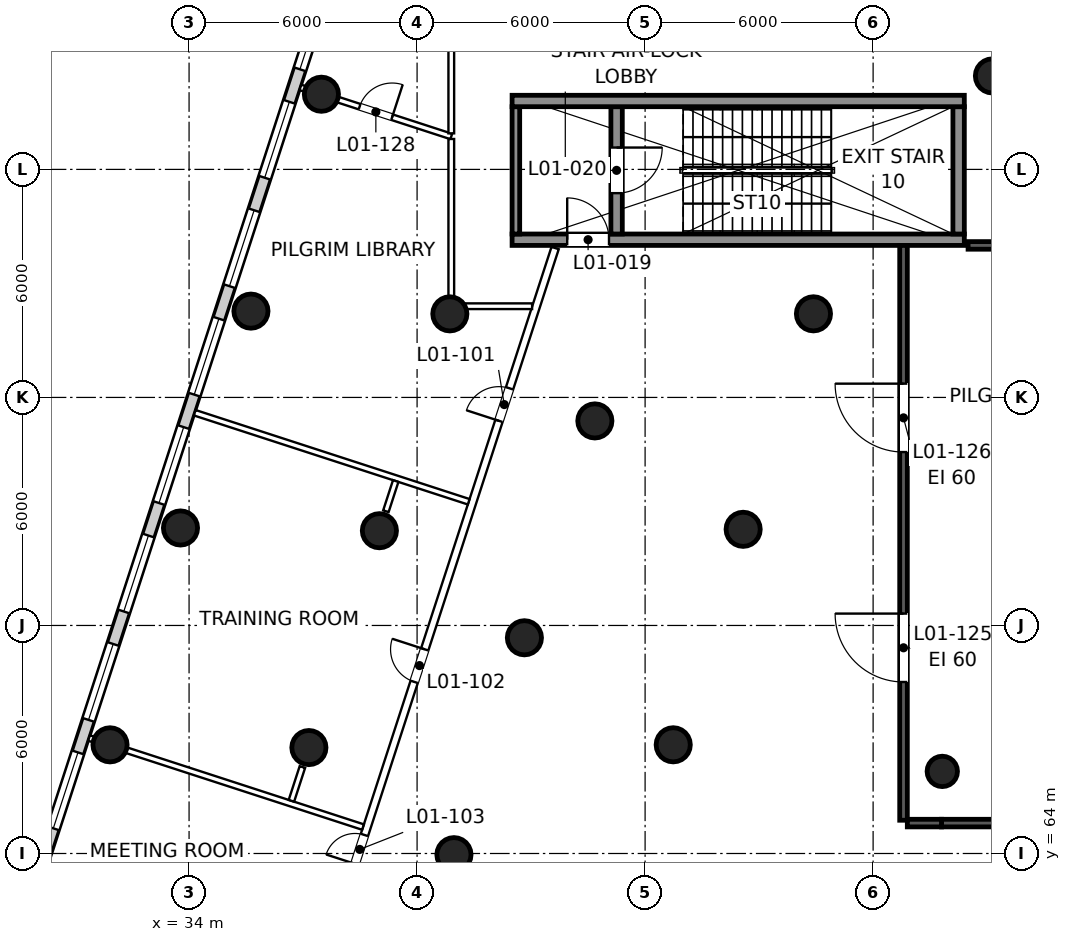
"""IFC4 building model, lengths in metres.
Left out: names, types, materials, properties, quantities, classifications, styles, units other than length and angle.
Written with IfcOpenShell. Run it as: python <this file> out.ifc"""

import sys

from ifc_helpers import new_model, si_unit, direction, frame, frame_2d, origin, origin_2d, place, context, subcontext, project, spatial, rectangle, circle, extrude, element, fill, save


model = new_model("IFC4")
c1 = context("Model", 3, precision=1e-05, world=origin(), true_north=direction((0.0, 1.0)))
c2 = subcontext(c1, "Body", "Model", "MODEL_VIEW")
j1 = project(units=[si_unit("LENGTHUNIT", "METRE"), si_unit("PLANEANGLEUNIT", "RADIAN")], contexts=[c1])
p1 = place(None, origin())
s1 = spatial("IfcSite", under=j1, at=p1, CompositionType="ELEMENT")
p2 = place(p1, origin())
s2 = spatial("IfcBuilding", under=s1, at=p2, CompositionType="ELEMENT")
p3 = place(p2, frame((0.0, 0.0, 9.0)))
s3 = spatial("IfcBuildingStorey", under=s2, at=p3, CompositionType="ELEMENT", Elevation=9.0)
for number, where, z_axis, x_axis in (
    (1, (55.14, 84.46, 0.0), (0.0, 0.0, 1.0), (1.0, 0.0, 0.0)),
    (2, (50.43, 78.2, 0.0), (0.0, 0.0, 1.0), (1.0, 0.0, 0.0)),
    (3, (48.58, 72.53, 0.0), (0.0, 0.0, 1.0), (1.0, 0.0, 0.0)),
    (4, (46.74, 66.86, 0.0), (0.0, 0.0, 1.0), (1.0, 0.0, 0.0)),
):
    element("IfcColumn", number, at=place(p3, frame(where, z_axis=z_axis, x_axis=x_axis)), inside=s3, PredefinedType="COLUMN", context=c2, shape_type="SweptSolid", body=[
        extrude(circle(Radius=0.45, at=origin_2d()), origin(), (0.0, 0.0, 1.0), 6.0),
    ])
p4 = place(p3, frame((53.82, 66.16, 0.0), z_axis=(0.0, 0.0, 1.0), x_axis=(1.0, 0.0, 0.0)))
e5 = element("IfcColumn", 5, at=p4, inside=s3, PredefinedType="COLUMN", context=c2, shape_type="SweptSolid", body=[
    extrude(circle(Radius=0.4, at=origin_2d()), origin(), (0.0, 0.0, 1.0), 6.0),
])
for number, where, z_axis, x_axis in (
    (6, (37.482, 83.978, 0.0), (0.0, 0.0, 1.0), (1.0, 0.0, 0.0)),
    (7, (35.628, 78.271, 0.0), (0.0, 0.0, 1.0), (1.0, 0.0, 0.0)),
    (8, (33.774, 72.565, 0.0), (0.0, 0.0, 1.0), (1.0, 0.0, 0.0)),
    (9, (31.92, 66.859, 0.0), (0.0, 0.0, 1.0), (1.0, 0.0, 0.0)),
    (10, (40.862, 78.199, 0.0), (0.0, 0.0, 1.0), (1.0, 0.0, 0.0)),
    (11, (39.008, 72.493, 0.0), (0.0, 0.0, 1.0), (1.0, 0.0, 0.0)),
    (12, (37.153, 66.787, 0.0), (0.0, 0.0, 1.0), (1.0, 0.0, 0.0)),
    (13, (44.678, 75.382, 0.0), (0.0, 0.0, 1.0), (1.0, 0.0, 0.0)),
    (14, (42.824, 69.676, 0.0), (0.0, 0.0, 1.0), (1.0, 0.0, 0.0)),
    (15, (40.97, 63.969, 0.0), (0.0, 0.0, 1.0), (1.0, 0.0, 0.0)),
):
    element("IfcColumn", number, at=place(p3, frame(where, z_axis=z_axis, x_axis=x_axis)), inside=s3, PredefinedType="COLUMN", context=c2, shape_type="SweptSolid", body=[
        extrude(circle(Radius=0.45, at=origin_2d()), origin(), (0.0, 0.0, 1.0), 6.0),
    ])
p5 = place(p3, frame((37.912, 87.697, 0.0), z_axis=(0.0, 0.0, 1.0), x_axis=(-0.309016476183, -0.951056684666, 0.0)))
e16 = element("IfcWall", 16, at=p5, inside=s3, PredefinedType="SOLIDWALL", context=c2, shape_type="SweptSolid", body=[
    extrude(rectangle(XDim=28.556, YDim=0.32, at=frame_2d((14.278, 0.0))), origin(), (0.0, 0.0, 1.0), 5.65),
])
p6 = place(p5, frame((1.121, 0.0, 0.9)))
e17 = element("IfcOpeningElement", 17, at=p6, cuts=e16, PredefinedType="OPENING", context=c2, shape_type="SweptSolid", body=[
    extrude(rectangle(XDim=2.1, YDim=3.0, at=frame_2d((1.05, 1.5))), frame((0.0, 0.17, 0.0), z_axis=(0.0, -1.0, 0.0), x_axis=(1.0, 0.0, 0.0)), (0.0, 0.0, 1.0), 0.34),
])
p7 = place(p5, frame((4.121, 0.0, 0.9)))
e18 = element("IfcOpeningElement", 18, at=p7, cuts=e16, PredefinedType="OPENING", context=c2, shape_type="SweptSolid", body=[
    extrude(rectangle(XDim=2.1, YDim=3.0, at=frame_2d((1.05, 1.5))), frame((0.0, 0.17, 0.0), z_axis=(0.0, -1.0, 0.0), x_axis=(1.0, 0.0, 0.0)), (0.0, 0.0, 1.0), 0.34),
])
p8 = place(p5, frame((7.121, 0.0, 0.9)))
e19 = element("IfcOpeningElement", 19, at=p8, cuts=e16, PredefinedType="OPENING", context=c2, shape_type="SweptSolid", body=[
    extrude(rectangle(XDim=2.1, YDim=3.0, at=frame_2d((1.05, 1.5))), frame((0.0, 0.17, 0.0), z_axis=(0.0, -1.0, 0.0), x_axis=(1.0, 0.0, 0.0)), (0.0, 0.0, 1.0), 0.34),
])
p9 = place(p5, frame((10.121, 0.0, 0.9)))
e20 = element("IfcOpeningElement", 20, at=p9, cuts=e16, PredefinedType="OPENING", context=c2, shape_type="SweptSolid", body=[
    extrude(rectangle(XDim=2.1, YDim=3.0, at=frame_2d((1.05, 1.5))), frame((0.0, 0.17, 0.0), z_axis=(0.0, -1.0, 0.0), x_axis=(1.0, 0.0, 0.0)), (0.0, 0.0, 1.0), 0.34),
])
p10 = place(p5, frame((13.121, 0.0, 0.9)))
e21 = element("IfcOpeningElement", 21, at=p10, cuts=e16, PredefinedType="OPENING", context=c2, shape_type="SweptSolid", body=[
    extrude(rectangle(XDim=2.1, YDim=3.0, at=frame_2d((1.05, 1.5))), frame((0.0, 0.17, 0.0), z_axis=(0.0, -1.0, 0.0), x_axis=(1.0, 0.0, 0.0)), (0.0, 0.0, 1.0), 0.34),
])
p11 = place(p5, frame((16.121, 0.0, 0.9)))
e22 = element("IfcOpeningElement", 22, at=p11, cuts=e16, PredefinedType="OPENING", context=c2, shape_type="SweptSolid", body=[
    extrude(rectangle(XDim=2.1, YDim=3.0, at=frame_2d((1.05, 1.5))), frame((0.0, 0.17, 0.0), z_axis=(0.0, -1.0, 0.0), x_axis=(1.0, 0.0, 0.0)), (0.0, 0.0, 1.0), 0.34),
])
p12 = place(p5, frame((19.121, 0.0, 0.9)))
e23 = element("IfcOpeningElement", 23, at=p12, cuts=e16, PredefinedType="OPENING", context=c2, shape_type="SweptSolid", body=[
    extrude(rectangle(XDim=2.1, YDim=3.0, at=frame_2d((1.05, 1.5))), frame((0.0, 0.17, 0.0), z_axis=(0.0, -1.0, 0.0), x_axis=(1.0, 0.0, 0.0)), (0.0, 0.0, 1.0), 0.34),
])
p13 = place(p5, frame((22.121, 0.0, 0.9)))
e24 = element("IfcOpeningElement", 24, at=p13, cuts=e16, PredefinedType="OPENING", context=c2, shape_type="SweptSolid", body=[
    extrude(rectangle(XDim=2.1, YDim=3.0, at=frame_2d((1.05, 1.5))), frame((0.0, 0.17, 0.0), z_axis=(0.0, -1.0, 0.0), x_axis=(1.0, 0.0, 0.0)), (0.0, 0.0, 1.0), 0.34),
])
p14 = place(p5, frame((25.121, 0.0, 0.9)))
e25 = element("IfcOpeningElement", 25, at=p14, cuts=e16, PredefinedType="OPENING", context=c2, shape_type="SweptSolid", body=[
    extrude(rectangle(XDim=2.1, YDim=3.0, at=frame_2d((1.05, 1.5))), frame((0.0, 0.17, 0.0), z_axis=(0.0, -1.0, 0.0), x_axis=(1.0, 0.0, 0.0)), (0.0, 0.0, 1.0), 0.34),
])
p15 = place(p3, frame((42.5, 80.15, 0.0), z_axis=(0.0, 0.0, 1.0), x_axis=(1.0, 0.0, 0.0)))
e26 = element("IfcWall", 26, at=p15, inside=s3, PredefinedType="SHEAR", context=c2, shape_type="SweptSolid", body=[
    extrude(rectangle(XDim=11.9, YDim=0.3, at=frame_2d((5.95, 0.0))), origin(), (0.0, 0.0, 1.0), 6.0),
])
p16 = place(p15, frame((1.45, 0.0, 0.0)))
e27 = element("IfcOpeningElement", 27, at=p16, cuts=e26, PredefinedType="OPENING", context=c2, shape_type="SweptSolid", body=[
    extrude(rectangle(XDim=1.1, YDim=2.1, at=frame_2d((0.55, 1.05))), frame((0.0, 0.16, 0.0), z_axis=(0.0, -1.0, 0.0), x_axis=(1.0, 0.0, 0.0)), (0.0, 0.0, 1.0), 0.32),
])
p17 = place(p3, frame((42.6, 80.3, 0.0), z_axis=(0.0, 0.0, 1.0), x_axis=(0.0, 1.0, 0.0)))
e28 = element("IfcWall", 28, at=p17, inside=s3, PredefinedType="SHEAR", context=c2, shape_type="SweptSolid", body=[
    extrude(rectangle(XDim=3.35, YDim=0.2, at=frame_2d((1.675, 0.0))), origin(), (0.0, 0.0, 1.0), 6.0),
])
p18 = place(p3, frame((45.25, 80.3, 0.0), z_axis=(0.0, 0.0, 1.0), x_axis=(0.0, 1.0, 0.0)))
e29 = element("IfcWall", 29, at=p18, inside=s3, PredefinedType="SHEAR", context=c2, shape_type="SweptSolid", body=[
    extrude(rectangle(XDim=3.35, YDim=0.3, at=frame_2d((1.675, 0.0))), origin(), (0.0, 0.0, 1.0), 6.0),
])
p19 = place(p18, frame((1.075, 0.0, 0.0)))
e30 = element("IfcOpeningElement", 30, at=p19, cuts=e29, PredefinedType="OPENING", context=c2, shape_type="SweptSolid", body=[
    extrude(rectangle(XDim=1.2, YDim=2.1, at=frame_2d((0.6, 1.05))), frame((0.0, 0.16, 0.0), z_axis=(0.0, -1.0, 0.0), x_axis=(1.0, 0.0, 0.0)), (0.0, 0.0, 1.0), 0.32),
])
p20 = place(p3, frame((54.25, 80.3, 0.0), z_axis=(0.0, 0.0, 1.0), x_axis=(0.0, 1.0, 0.0)))
e31 = element("IfcWall", 31, at=p20, inside=s3, PredefinedType="SHEAR", context=c2, shape_type="SweptSolid", body=[
    extrude(rectangle(XDim=3.35, YDim=0.3, at=frame_2d((1.675, 0.0))), origin(), (0.0, 0.0, 1.0), 6.0),
])
p21 = place(p3, frame((42.5, 83.8, 0.0), z_axis=(0.0, 0.0, 1.0), x_axis=(1.0, 0.0, 0.0)))
e32 = element("IfcWall", 32, at=p21, inside=s3, PredefinedType="SHEAR", context=c2, shape_type="SweptSolid", body=[
    extrude(rectangle(XDim=11.9, YDim=0.3, at=frame_2d((5.95, 0.0))), origin(), (0.0, 0.0, 1.0), 6.0),
])
p22 = place(p3, frame((37.833, 62.081, 0.0), z_axis=(0.0, 0.0, 1.0), x_axis=(0.309014892187, 0.951057199335, 0.0)))
e33 = element("IfcWall", 33, at=p22, inside=s3, PredefinedType="PARTITIONING", context=c2, shape_type="SweptSolid", body=[
    extrude(rectangle(XDim=18.769, YDim=0.2, at=frame_2d((9.384, 0.0))), origin(), (0.0, 0.0, 1.0), 5.65),
])
p23 = place(p22, frame((13.988, 0.0, 0.0)))
e34 = element("IfcOpeningElement", 34, at=p23, cuts=e33, PredefinedType="OPENING", context=c2, shape_type="SweptSolid", body=[
    extrude(rectangle(XDim=0.9, YDim=2.1, at=frame_2d((0.45, 1.05))), frame((0.0, 0.11, 0.0), z_axis=(0.0, -1.0, 0.0), x_axis=(1.0, 0.0, 0.0)), (0.0, 0.0, 1.0), 0.22),
])
p24 = place(p22, frame((6.767, 0.0, 0.0)))
e35 = element("IfcOpeningElement", 35, at=p24, cuts=e33, PredefinedType="OPENING", context=c2, shape_type="SweptSolid", body=[
    extrude(rectangle(XDim=0.9, YDim=2.1, at=frame_2d((0.45, 1.05))), frame((0.0, 0.11, 0.0), z_axis=(0.0, -1.0, 0.0), x_axis=(1.0, 0.0, 0.0)), (0.0, 0.0, 1.0), 0.22),
])
p25 = place(p22, frame((1.731, 0.0, 0.0)))
e36 = element("IfcOpeningElement", 36, at=p25, cuts=e33, PredefinedType="OPENING", context=c2, shape_type="SweptSolid", body=[
    extrude(rectangle(XDim=0.8, YDim=2.1, at=frame_2d((0.4, 1.05))), frame((0.0, 0.11, 0.0), z_axis=(0.0, -1.0, 0.0), x_axis=(1.0, 0.0, 0.0)), (0.0, 0.0, 1.0), 0.22),
])
p26 = place(p3, frame((54.499, 80.0, 0.0), z_axis=(0.0, 0.0, 1.0), x_axis=(1.0, 0.0, 0.0)))
e37 = element("IfcWall", 37, at=p26, inside=s3, PredefinedType="PARTITIONING", context=c2, shape_type="SweptSolid", body=[
    extrude(rectangle(XDim=2.301, YDim=0.2, at=frame_2d((1.15, 0.0))), origin(), (0.0, 0.0, 1.0), 5.65),
])
p27 = place(p3, frame((36.93, 84.157, 0.0), z_axis=(0.0, 0.0, 1.0), x_axis=(0.951059855583, -0.309006716915, 0.0)))
e38 = element("IfcWall", 38, at=p27, inside=s3, PredefinedType="PARTITIONING", context=c2, shape_type="SweptSolid", body=[
    extrude(rectangle(XDim=4.174, YDim=0.15, at=frame_2d((2.087, 0.0))), origin(), (0.0, 0.0, 1.0), 5.65),
])
p28 = place(p27, frame((1.637, 0.0, 0.0)))
e39 = element("IfcOpeningElement", 39, at=p28, cuts=e38, PredefinedType="OPENING", context=c2, shape_type="SweptSolid", body=[
    extrude(rectangle(XDim=0.9, YDim=2.1, at=frame_2d((0.45, 1.05))), frame((0.0, 0.085, 0.0), z_axis=(0.0, -1.0, 0.0), x_axis=(1.0, 0.0, 0.0)), (0.0, 0.0, 1.0), 0.17),
])
for number, where, z_axis, x_axis in (
    (40, (34.149, 75.597, 0.0), (0.0, 0.0, 1.0), (0.951, -0.309, 0.0)),
    (41, (31.368, 67.038, 0.0), (0.0, 0.0, 1.0), (0.951, -0.309, 0.0)),
):
    element("IfcWall", number, at=place(p3, frame(where, z_axis=z_axis, x_axis=x_axis)), inside=s3, PredefinedType="PARTITIONING", context=c2, shape_type="SweptSolid", body=[
        extrude(rectangle(XDim=7.58, YDim=0.15, at=frame_2d((3.79, 0.0))), origin(), (0.0, 0.0, 1.0), 4.95),
    ])
p29 = place(p3, frame((86.2, 64.8, 0.0), z_axis=(0.0, 0.0, 1.0), x_axis=(-1.0, 0.0, 0.0)))
e42 = element("IfcWall", 42, at=p29, inside=s3, PredefinedType="PARTITIONING", context=c2, shape_type="SweptSolid", body=[
    extrude(rectangle(XDim=32.4, YDim=0.2, at=frame_2d((16.2, 0.0))), origin(), (0.0, 0.0, 1.0), 5.65),
])
p30 = place(p29, frame((8.45, 0.0, 0.0)))
e43 = element("IfcOpeningElement", 43, at=p30, cuts=e42, PredefinedType="OPENING", context=c2, shape_type="SweptSolid", body=[
    extrude(rectangle(XDim=1.8, YDim=2.1, at=frame_2d((0.9, 1.05))), frame((0.0, 0.11, 0.0), z_axis=(0.0, -1.0, 0.0), x_axis=(1.0, 0.0, 0.0)), (0.0, 0.0, 1.0), 0.22),
])
p31 = place(p29, frame((22.15, 0.0, 0.0)))
e44 = element("IfcOpeningElement", 44, at=p31, cuts=e42, PredefinedType="OPENING", context=c2, shape_type="SweptSolid", body=[
    extrude(rectangle(XDim=1.8, YDim=2.1, at=frame_2d((0.9, 1.05))), frame((0.0, 0.11, 0.0), z_axis=(0.0, -1.0, 0.0), x_axis=(1.0, 0.0, 0.0)), (0.0, 0.0, 1.0), 0.22),
])
p32 = place(p3, frame((53.8, 64.8, 0.0), z_axis=(0.0, 0.0, 1.0), x_axis=(-1.0, 0.0, 0.0)))
e45 = element("IfcWall", 45, at=p32, inside=s3, PredefinedType="PARTITIONING", context=c2, shape_type="SweptSolid", body=[
    extrude(rectangle(XDim=0.9, YDim=0.2, at=frame_2d((0.45, 0.0))), origin(), (0.0, 0.0, 1.0), 4.85),
])
p33 = place(p3, frame((52.8, 64.875, 0.0), z_axis=(0.0, 0.0, 1.0), x_axis=(0.0, 1.0, 0.0)))
e46 = element("IfcWall", 46, at=p33, inside=s3, PredefinedType="PARTITIONING", context=c2, shape_type="SweptSolid", body=[
    extrude(rectangle(XDim=15.125, YDim=0.2, at=frame_2d((7.562, 0.0))), origin(), (0.0, 0.0, 1.0), 5.65),
])
p34 = place(p33, frame((3.637, 0.0, 0.0)))
e47 = element("IfcOpeningElement", 47, at=p34, cuts=e46, PredefinedType="OPENING", context=c2, shape_type="SweptSolid", body=[
    extrude(rectangle(XDim=1.8, YDim=2.1, at=frame_2d((0.9, 1.05))), frame((0.0, 0.11, 0.0), z_axis=(0.0, -1.0, 0.0), x_axis=(1.0, 0.0, 0.0)), (0.0, 0.0, 1.0), 0.22),
])
p35 = place(p33, frame((9.688, 0.0, 0.0)))
e48 = element("IfcOpeningElement", 48, at=p35, cuts=e46, PredefinedType="OPENING", context=c2, shape_type="SweptSolid", body=[
    extrude(rectangle(XDim=1.8, YDim=2.1, at=frame_2d((0.9, 1.05))), frame((0.0, 0.11, 0.0), z_axis=(0.0, -1.0, 0.0), x_axis=(1.0, 0.0, 0.0)), (0.0, 0.0, 1.0), 0.22),
])
p36 = place(p3, frame((39.179, 73.005, 0.0), z_axis=(0.0, 0.0, 1.0), x_axis=(0.309033234433, 0.951051239427, 0.0)))
e49 = element("IfcWall", 49, at=p36, inside=s3, PredefinedType="PARTITIONING", context=c2, shape_type="SweptSolid", body=[
    extrude(rectangle(XDim=0.836, YDim=0.15, at=frame_2d((0.418, 0.0))), origin(), (0.0, 0.0, 1.0), 4.95),
])
p37 = place(p3, frame((36.982, 66.275, 0.0), z_axis=(0.0, 0.0, 1.0), x_axis=(-0.309162892006, -0.951009098908, 0.0)))
e50 = element("IfcWall", 50, at=p37, inside=s3, PredefinedType="PARTITIONING", context=c2, shape_type="SweptSolid", body=[
    extrude(rectangle(XDim=0.934, YDim=0.15, at=frame_2d((0.467, 0.0))), origin(), (0.0, 0.0, 1.0), 4.95),
])
p38 = place(p3, frame((40.9, 82.8, 0.0), z_axis=(0.0, 0.0, 1.0), x_axis=(0.0, -1.0, 0.0)))
e51 = element("IfcWall", 51, at=p38, inside=s3, PredefinedType="PARTITIONING", context=c2, shape_type="SweptSolid", body=[
    extrude(rectangle(XDim=4.46, YDim=0.15, at=frame_2d((2.23, 0.0))), origin(), (0.0, 0.0, 1.0), 5.65),
])
p39 = place(p3, frame((40.84, 78.4, 0.0), z_axis=(0.0, 0.0, 1.0), x_axis=(1.0, 0.0, 0.0)))
e52 = element("IfcWall", 52, at=p39, inside=s3, PredefinedType="PARTITIONING", context=c2, shape_type="SweptSolid", body=[
    extrude(rectangle(XDim=2.187, YDim=0.15, at=frame_2d((1.093, 0.0))), origin(), (0.0, 0.0, 1.0), 4.95),
])
p40 = place(p3, frame((40.9, 85.61, 0.0), z_axis=(0.0, 0.0, 1.0), x_axis=(0.0, -1.0, 0.0)))
e53 = element("IfcWall", 53, at=p40, inside=s3, PredefinedType="PARTITIONING", context=c2, shape_type="SweptSolid", body=[
    extrude(rectangle(XDim=2.661, YDim=0.15, at=frame_2d((1.331, 0.0))), origin(), (0.0, 0.0, 1.0), 5.65),
])
p41 = place(p6, origin())
e54 = element("IfcWindow", 54, at=p41, inside=s3, PartitioningType="SINGLE_PANEL", PredefinedType="WINDOW", context=c2, shape_type="SweptSolid", body=[
    extrude(rectangle(XDim=2.1, YDim=3.0, at=frame_2d((1.05, 1.5))), frame((0.0, 0.07, 0.0), z_axis=(0.0, -1.0, 0.0), x_axis=(1.0, 0.0, 0.0)), (0.0, 0.0, 1.0), 0.06),
])
fill(e17, e54)
p42 = place(p7, origin())
e55 = element("IfcWindow", 55, at=p42, inside=s3, PartitioningType="SINGLE_PANEL", PredefinedType="WINDOW", context=c2, shape_type="SweptSolid", body=[
    extrude(rectangle(XDim=2.1, YDim=3.0, at=frame_2d((1.05, 1.5))), frame((0.0, 0.07, 0.0), z_axis=(0.0, -1.0, 0.0), x_axis=(1.0, 0.0, 0.0)), (0.0, 0.0, 1.0), 0.06),
])
fill(e18, e55)
p43 = place(p8, origin())
e56 = element("IfcWindow", 56, at=p43, inside=s3, PartitioningType="SINGLE_PANEL", PredefinedType="WINDOW", context=c2, shape_type="SweptSolid", body=[
    extrude(rectangle(XDim=2.1, YDim=3.0, at=frame_2d((1.05, 1.5))), frame((0.0, 0.07, 0.0), z_axis=(0.0, -1.0, 0.0), x_axis=(1.0, 0.0, 0.0)), (0.0, 0.0, 1.0), 0.06),
])
fill(e19, e56)
p44 = place(p9, origin())
e57 = element("IfcWindow", 57, at=p44, inside=s3, PartitioningType="SINGLE_PANEL", PredefinedType="WINDOW", context=c2, shape_type="SweptSolid", body=[
    extrude(rectangle(XDim=2.1, YDim=3.0, at=frame_2d((1.05, 1.5))), frame((0.0, 0.07, 0.0), z_axis=(0.0, -1.0, 0.0), x_axis=(1.0, 0.0, 0.0)), (0.0, 0.0, 1.0), 0.06),
])
fill(e20, e57)
p45 = place(p10, origin())
e58 = element("IfcWindow", 58, at=p45, inside=s3, PartitioningType="SINGLE_PANEL", PredefinedType="WINDOW", context=c2, shape_type="SweptSolid", body=[
    extrude(rectangle(XDim=2.1, YDim=3.0, at=frame_2d((1.05, 1.5))), frame((0.0, 0.07, 0.0), z_axis=(0.0, -1.0, 0.0), x_axis=(1.0, 0.0, 0.0)), (0.0, 0.0, 1.0), 0.06),
])
fill(e21, e58)
p46 = place(p11, origin())
e59 = element("IfcWindow", 59, at=p46, inside=s3, PartitioningType="SINGLE_PANEL", PredefinedType="WINDOW", context=c2, shape_type="SweptSolid", body=[
    extrude(rectangle(XDim=2.1, YDim=3.0, at=frame_2d((1.05, 1.5))), frame((0.0, 0.07, 0.0), z_axis=(0.0, -1.0, 0.0), x_axis=(1.0, 0.0, 0.0)), (0.0, 0.0, 1.0), 0.06),
])
fill(e22, e59)
p47 = place(p12, origin())
e60 = element("IfcWindow", 60, at=p47, inside=s3, PartitioningType="SINGLE_PANEL", PredefinedType="WINDOW", context=c2, shape_type="SweptSolid", body=[
    extrude(rectangle(XDim=2.1, YDim=3.0, at=frame_2d((1.05, 1.5))), frame((0.0, 0.07, 0.0), z_axis=(0.0, -1.0, 0.0), x_axis=(1.0, 0.0, 0.0)), (0.0, 0.0, 1.0), 0.06),
])
fill(e23, e60)
p48 = place(p13, origin())
e61 = element("IfcWindow", 61, at=p48, inside=s3, PartitioningType="SINGLE_PANEL", PredefinedType="WINDOW", context=c2, shape_type="SweptSolid", body=[
    extrude(rectangle(XDim=2.1, YDim=3.0, at=frame_2d((1.05, 1.5))), frame((0.0, 0.07, 0.0), z_axis=(0.0, -1.0, 0.0), x_axis=(1.0, 0.0, 0.0)), (0.0, 0.0, 1.0), 0.06),
])
fill(e24, e61)
p49 = place(p16, origin())
e62 = element("IfcDoor", 62, at=p49, inside=s3, OperationType="SINGLE_SWING_LEFT", PredefinedType="DOOR", context=c2, shape_type="SweptSolid", body=[
    extrude(rectangle(XDim=1.1, YDim=2.1, at=frame_2d((0.55, 1.05))), frame((0.0, 0.025, 0.0), z_axis=(0.0, -1.0, 0.0), x_axis=(1.0, 0.0, 0.0)), (0.0, 0.0, 1.0), 0.05),
])
fill(e27, e62)
p50 = place(p19, frame((1.2, 0.0, 0.0), z_axis=(0.0, 0.0, 1.0), x_axis=(-1.0, 0.0, 0.0)))
e63 = element("IfcDoor", 63, at=p50, inside=s3, OperationType="SINGLE_SWING_LEFT", PredefinedType="DOOR", context=c2, shape_type="SweptSolid", body=[
    extrude(rectangle(XDim=1.2, YDim=2.1, at=frame_2d((0.6, 1.05))), frame((0.0, 0.025, 0.0), z_axis=(0.0, -1.0, 0.0), x_axis=(1.0, 0.0, 0.0)), (0.0, 0.0, 1.0), 0.05),
])
fill(e30, e63)
p51 = place(p23, origin())
e64 = element("IfcDoor", 64, at=p51, inside=s3, OperationType="SINGLE_SWING_LEFT", PredefinedType="DOOR", context=c2, shape_type="SweptSolid", body=[
    extrude(rectangle(XDim=0.9, YDim=2.1, at=frame_2d((0.45, 1.05))), frame((0.0, 0.025, 0.0), z_axis=(0.0, -1.0, 0.0), x_axis=(1.0, 0.0, 0.0)), (0.0, 0.0, 1.0), 0.05),
])
fill(e34, e64)
p52 = place(p24, origin())
e65 = element("IfcDoor", 65, at=p52, inside=s3, OperationType="SINGLE_SWING_RIGHT", PredefinedType="DOOR", context=c2, shape_type="SweptSolid", body=[
    extrude(rectangle(XDim=0.9, YDim=2.1, at=frame_2d((0.45, 1.05))), frame((0.0, 0.025, 0.0), z_axis=(0.0, -1.0, 0.0), x_axis=(1.0, 0.0, 0.0)), (0.0, 0.0, 1.0), 0.05),
])
fill(e35, e65)
p53 = place(p25, origin())
e66 = element("IfcDoor", 66, at=p53, inside=s3, OperationType="SINGLE_SWING_LEFT", PredefinedType="DOOR", context=c2, shape_type="SweptSolid", body=[
    extrude(rectangle(XDim=0.8, YDim=2.1, at=frame_2d((0.4, 1.05))), frame((0.0, 0.025, 0.0), z_axis=(0.0, -1.0, 0.0), x_axis=(1.0, 0.0, 0.0)), (0.0, 0.0, 1.0), 0.05),
])
fill(e36, e66)
p54 = place(p34, origin())
e67 = element("IfcDoor", 67, at=p54, inside=s3, OperationType="DOUBLE_DOOR_SINGLE_SWING", PredefinedType="DOOR", context=c2, shape_type="SweptSolid", body=[
    extrude(rectangle(XDim=1.8, YDim=2.1, at=frame_2d((0.9, 1.05))), frame((0.0, 0.025, 0.0), z_axis=(0.0, -1.0, 0.0), x_axis=(1.0, 0.0, 0.0)), (0.0, 0.0, 1.0), 0.05),
])
fill(e47, e67)
p55 = place(p35, origin())
e68 = element("IfcDoor", 68, at=p55, inside=s3, OperationType="DOUBLE_DOOR_SINGLE_SWING", PredefinedType="DOOR", context=c2, shape_type="SweptSolid", body=[
    extrude(rectangle(XDim=1.8, YDim=2.1, at=frame_2d((0.9, 1.05))), frame((0.0, 0.025, 0.0), z_axis=(0.0, -1.0, 0.0), x_axis=(1.0, 0.0, 0.0)), (0.0, 0.0, 1.0), 0.05),
])
fill(e48, e68)
p56 = place(p28, origin())
e69 = element("IfcDoor", 69, at=p56, inside=s3, OperationType="SINGLE_SWING_RIGHT", PredefinedType="DOOR", context=c2, shape_type="SweptSolid", body=[
    extrude(rectangle(XDim=0.9, YDim=2.1, at=frame_2d((0.45, 1.05))), frame((0.0, 0.025, 0.0), z_axis=(0.0, -1.0, 0.0), x_axis=(1.0, 0.0, 0.0)), (0.0, 0.0, 1.0), 0.05),
])
fill(e39, e69)
save(model, sys.argv[1])
